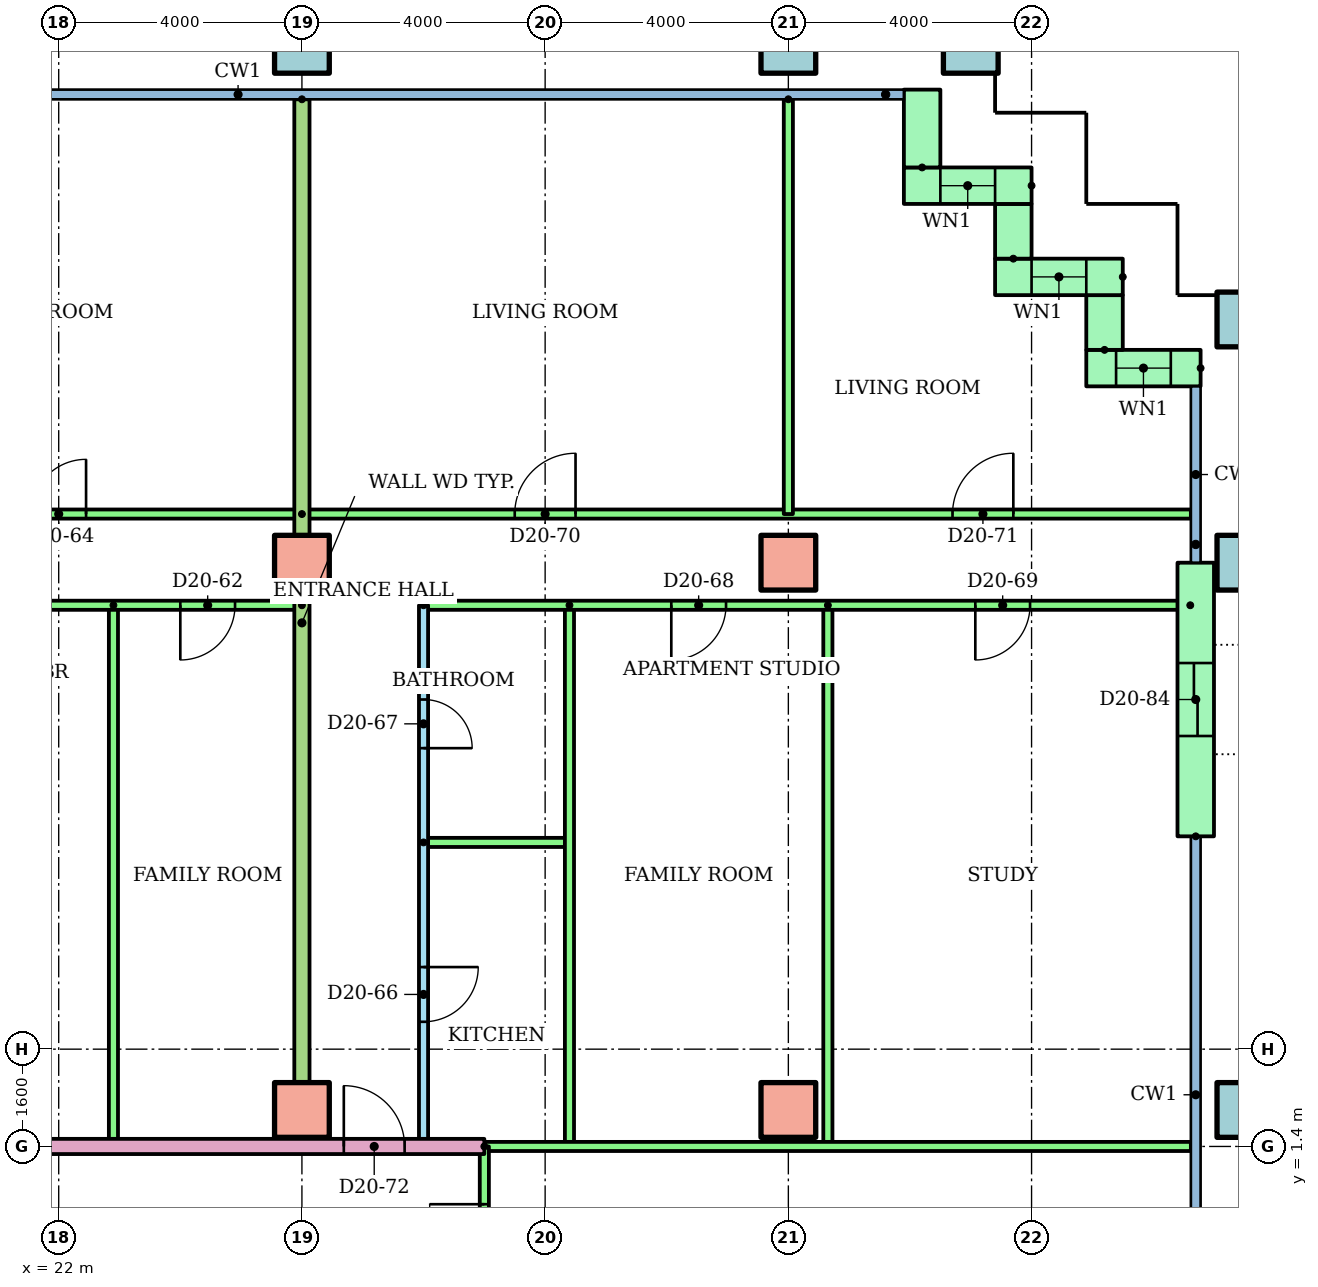
"""IFC4 building model, lengths in metres.
Left out: names, types, materials, properties, quantities, classifications, styles, units other than length and angle.
Written with IfcOpenShell. Run it as: python <this file> out.ifc"""

import sys

from ifc_helpers import new_model, si_unit, direction, frame, frame_2d, origin, origin_2d, place, context, subcontext, project, spatial, rectangle, hollow_rectangle, extrude, element, fill, save


model = new_model("IFC4")
c1 = context("Model", 3, precision=1e-05, world=origin(), true_north=direction((0.0, 1.0)))
c2 = subcontext(c1, "Body", "Model", "MODEL_VIEW")
j1 = project(units=[si_unit("LENGTHUNIT", "METRE"), si_unit("PLANEANGLEUNIT", "RADIAN")], contexts=[c1])
p1 = place(None, origin())
s1 = spatial("IfcSite", under=j1, at=p1, CompositionType="ELEMENT")
p2 = place(p1, origin())
s2 = spatial("IfcBuilding", under=s1, at=p2, CompositionType="ELEMENT")
p3 = place(p2, frame((0.0, 0.0, 80.7)))
s3 = spatial("IfcBuildingStorey", under=s2, at=p3, CompositionType="ELEMENT", Elevation=80.7)
for number, where in (
    (1, (26.0, 2.0, 0.0)),
    (2, (34.0, 2.0, 0.0)),
):
    element("IfcColumn", number, at=place(p3, frame(where)), inside=s3, PredefinedType="COLUMN", context=c2, shape_type="SweptSolid", body=[
        extrude(rectangle(XDim=0.9, YDim=0.9, at=origin_2d()), origin(), (0.0, 0.0, 1.0), 3.2),
    ])
p4 = place(p3, frame((41.5, 2.0, 0.0)))
e3 = element("IfcColumn", 3, at=p4, inside=s3, PredefinedType="COLUMN", context=c2, shape_type="SweptSolid", body=[
    extrude(hollow_rectangle(XDim=0.9, YDim=0.9, WallThickness=0.045, at=origin_2d()), origin(), (0.0, 0.0, 1.0), 3.2),
])
for number, where in (
    (4, (26.0, 11.0, 0.0)),
    (5, (34.0, 11.0, 0.0)),
):
    element("IfcColumn", number, at=place(p3, frame(where)), inside=s3, PredefinedType="COLUMN", context=c2, shape_type="SweptSolid", body=[
        extrude(rectangle(XDim=0.9, YDim=0.9, at=origin_2d()), origin(), (0.0, 0.0, 1.0), 3.2),
    ])
for number, where in (
    (6, (41.5, 11.0, 0.0)),
    (7, (41.5, 15.0, 0.0)),
    (8, (26.0, 19.5, 0.0)),
    (9, (34.0, 19.5, 0.0)),
    (10, (37.0, 19.5, 0.0)),
):
    element("IfcColumn", number, at=place(p3, frame(where)), inside=s3, PredefinedType="COLUMN", context=c2, shape_type="SweptSolid", body=[
        extrude(hollow_rectangle(XDim=0.9, YDim=0.9, WallThickness=0.045, at=origin_2d()), origin(), (0.0, 0.0, 1.0), 3.2),
    ])
p5 = place(p3, frame((40.78, 14.2, 0.0), z_axis=(0.0, 0.0, 1.0), x_axis=(-1.0, 0.0, 0.0)))
e11 = element("IfcWall", 11, at=p5, inside=s3, PredefinedType="STANDARD", context=c2, shape_type="SweptSolid", body=[
    extrude(rectangle(XDim=1.88, YDim=0.6, at=frame_2d((0.94, 0.0))), origin(), (0.0, 0.0, 1.0), 2.92),
])
p6 = place(p5, frame((0.49, 0.0, 0.9)))
e12 = element("IfcOpeningElement", 12, at=p6, cuts=e11, PredefinedType="OPENING", context=c2, shape_type="SweptSolid", body=[
    extrude(rectangle(XDim=0.9, YDim=1.5, at=frame_2d((0.45, 0.75))), frame((0.0, 0.31, 0.0), z_axis=(0.0, -1.0, 0.0), x_axis=(1.0, 0.0, 0.0)), (0.0, 0.0, 1.0), 0.62),
])
p7 = place(p3, frame((39.2, 14.5, 0.0), z_axis=(0.0, 0.0, 1.0), x_axis=(0.0, 1.0, 0.0)))
e13 = element("IfcWall", 13, at=p7, inside=s3, PredefinedType="STANDARD", context=c2, shape_type="SweptSolid", body=[
    extrude(rectangle(XDim=0.9, YDim=0.6, at=frame_2d((0.45, 0.0))), origin(), (0.0, 0.0, 1.0), 2.92),
])
p8 = place(p3, frame((39.5, 15.7, 0.0), z_axis=(0.0, 0.0, 1.0), x_axis=(-1.0, 0.0, 0.0)))
e14 = element("IfcWall", 14, at=p8, inside=s3, PredefinedType="STANDARD", context=c2, shape_type="SweptSolid", body=[
    extrude(rectangle(XDim=2.1, YDim=0.6, at=frame_2d((1.05, 0.0))), origin(), (0.0, 0.0, 1.0), 2.92),
])
p9 = place(p8, frame((0.6, 0.0, 0.9)))
e15 = element("IfcOpeningElement", 15, at=p9, cuts=e14, PredefinedType="OPENING", context=c2, shape_type="SweptSolid", body=[
    extrude(rectangle(XDim=0.9, YDim=1.5, at=frame_2d((0.45, 0.75))), frame((0.0, 0.31, 0.0), z_axis=(0.0, -1.0, 0.0), x_axis=(1.0, 0.0, 0.0)), (0.0, 0.0, 1.0), 0.62),
])
p10 = place(p3, frame((37.7, 16.0, 0.0), z_axis=(0.0, 0.0, 1.0), x_axis=(0.0, 1.0, 0.0)))
e16 = element("IfcWall", 16, at=p10, inside=s3, PredefinedType="STANDARD", context=c2, shape_type="SweptSolid", body=[
    extrude(rectangle(XDim=0.9, YDim=0.6, at=frame_2d((0.45, 0.0))), origin(), (0.0, 0.0, 1.0), 2.92),
])
p11 = place(p3, frame((38.0, 17.2, 0.0), z_axis=(0.0, 0.0, 1.0), x_axis=(-1.0, 0.0, 0.0)))
e17 = element("IfcWall", 17, at=p11, inside=s3, PredefinedType="STANDARD", context=c2, shape_type="SweptSolid", body=[
    extrude(rectangle(XDim=2.1, YDim=0.6, at=frame_2d((1.05, 0.0))), origin(), (0.0, 0.0, 1.0), 2.92),
])
p12 = place(p11, frame((0.6, 0.0, 0.9)))
e18 = element("IfcOpeningElement", 18, at=p12, cuts=e17, PredefinedType="OPENING", context=c2, shape_type="SweptSolid", body=[
    extrude(rectangle(XDim=0.9, YDim=1.5, at=frame_2d((0.45, 0.75))), frame((0.0, 0.31, 0.0), z_axis=(0.0, -1.0, 0.0), x_axis=(1.0, 0.0, 0.0)), (0.0, 0.0, 1.0), 0.62),
])
p13 = place(p3, frame((36.2, 17.5, 0.0), z_axis=(0.0, 0.0, 1.0), x_axis=(0.0, 1.0, 0.0)))
e19 = element("IfcWall", 19, at=p13, inside=s3, PredefinedType="STANDARD", context=c2, shape_type="SweptSolid", body=[
    extrude(rectangle(XDim=1.28, YDim=0.6, at=frame_2d((0.64, 0.0))), origin(), (0.0, 0.0, 1.0), 2.92),
])
p14 = place(p3, frame((40.7, 6.5, 0.0), z_axis=(0.0, 0.0, 1.0), x_axis=(0.0, 1.0, 0.0)))
e20 = element("IfcWall", 20, at=p14, inside=s3, PredefinedType="STANDARD", context=c2, shape_type="SweptSolid", body=[
    extrude(rectangle(XDim=4.5, YDim=0.6, at=frame_2d((2.25, 0.0))), origin(), (0.0, 0.0, 1.0), 2.92),
])
p15 = place(p14, frame((1.65, 0.0, 0.0)))
e21 = element("IfcOpeningElement", 21, at=p15, cuts=e20, PredefinedType="OPENING", context=c2, shape_type="SweptSolid", body=[
    extrude(rectangle(XDim=1.2, YDim=2.1, at=frame_2d((0.6, 1.05))), frame((0.0, 0.31, 0.0), z_axis=(0.0, -1.0, 0.0), x_axis=(1.0, 0.0, 0.0)), (0.0, 0.0, 1.0), 0.62),
])
p16 = place(p3, frame((22.9, 10.3, 0.0), z_axis=(0.0, 0.0, 1.0), x_axis=(0.0, -1.0, 0.0)))
e22 = element("IfcWall", 22, at=p16, inside=s3, PredefinedType="PARTITIONING", context=c2, shape_type="SweptSolid", body=[
    extrude(rectangle(XDim=8.9, YDim=0.15, at=frame_2d((4.45, 0.0))), origin(), (0.0, 0.0, 1.0), 2.4),
])
p17 = place(p3, frame((26.0, 10.3, 0.0), z_axis=(0.0, 0.0, 1.0), x_axis=(-1.0, 0.0, 0.0)))
e23 = element("IfcWall", 23, at=p17, inside=s3, PredefinedType="PARTITIONING", context=c2, shape_type="SweptSolid", body=[
    extrude(rectangle(XDim=10.0, YDim=0.15, at=frame_2d((5.0, 0.0))), origin(), (0.0, 0.0, 1.0), 2.4),
])
p18 = place(p17, frame((4.9, 0.0, 0.0)))
e24 = element("IfcOpeningElement", 24, at=p18, cuts=e23, PredefinedType="OPENING", context=c2, shape_type="SweptSolid", body=[
    extrude(rectangle(XDim=0.9, YDim=2.1, at=frame_2d((0.45, 1.05))), frame((0.0, 0.085, 0.0), z_axis=(0.0, -1.0, 0.0), x_axis=(1.0, 0.0, 0.0)), (0.0, 0.0, 1.0), 0.17),
])
p19 = place(p17, frame((1.1, 0.0, 0.0)))
e25 = element("IfcOpeningElement", 25, at=p19, cuts=e23, PredefinedType="OPENING", context=c2, shape_type="SweptSolid", body=[
    extrude(rectangle(XDim=0.9, YDim=2.1, at=frame_2d((0.45, 1.05))), frame((0.0, 0.085, 0.0), z_axis=(0.0, -1.0, 0.0), x_axis=(1.0, 0.0, 0.0)), (0.0, 0.0, 1.0), 0.17),
])
p20 = place(p3, frame((14.0, 11.8, 0.0)))
e26 = element("IfcWall", 26, at=p20, inside=s3, PredefinedType="PARTITIONING", context=c2, shape_type="SweptSolid", body=[
    extrude(rectangle(XDim=12.0, YDim=0.15, at=frame_2d((6.0, 0.0))), origin(), (0.0, 0.0, 1.0), 2.4),
])
p21 = place(p20, frame((1.5, 0.0, 0.0)))
e27 = element("IfcOpeningElement", 27, at=p21, cuts=e26, PredefinedType="OPENING", context=c2, shape_type="SweptSolid", body=[
    extrude(rectangle(XDim=1.0, YDim=2.1, at=frame_2d((0.5, 1.05))), frame((0.0, 0.085, 0.0), z_axis=(0.0, -1.0, 0.0), x_axis=(1.0, 0.0, 0.0)), (0.0, 0.0, 1.0), 0.17),
])
p22 = place(p20, frame((7.55, 0.0, 0.0)))
e28 = element("IfcOpeningElement", 28, at=p22, cuts=e26, PredefinedType="OPENING", context=c2, shape_type="SweptSolid", body=[
    extrude(rectangle(XDim=0.9, YDim=2.1, at=frame_2d((0.45, 1.05))), frame((0.0, 0.085, 0.0), z_axis=(0.0, -1.0, 0.0), x_axis=(1.0, 0.0, 0.0)), (0.0, 0.0, 1.0), 0.17),
])
p23 = place(p3, frame((28.0, 10.3, 0.0), z_axis=(0.0, 0.0, 1.0), x_axis=(0.0, -1.0, 0.0)))
e29 = element("IfcWall", 29, at=p23, inside=s3, PredefinedType="PARTITIONING", context=c2, shape_type="SweptSolid", body=[
    extrude(rectangle(XDim=8.9, YDim=0.15, at=frame_2d((4.45, 0.0))), origin(), (0.0, 0.0, 1.0), 2.4),
])
p24 = place(p23, frame((5.95, 0.0, 0.0)))
e30 = element("IfcOpeningElement", 30, at=p24, cuts=e29, PredefinedType="OPENING", context=c2, shape_type="SweptSolid", body=[
    extrude(rectangle(XDim=0.9, YDim=2.1, at=frame_2d((0.45, 1.05))), frame((0.0, 0.085, 0.0), z_axis=(0.0, -1.0, 0.0), x_axis=(1.0, 0.0, 0.0)), (0.0, 0.0, 1.0), 0.17),
])
p25 = place(p23, frame((1.55, 0.0, 0.0)))
e31 = element("IfcOpeningElement", 31, at=p25, cuts=e29, PredefinedType="OPENING", context=c2, shape_type="SweptSolid", body=[
    extrude(rectangle(XDim=0.8, YDim=2.1, at=frame_2d((0.4, 1.05))), frame((0.0, 0.085, 0.0), z_axis=(0.0, -1.0, 0.0), x_axis=(1.0, 0.0, 0.0)), (0.0, 0.0, 1.0), 0.17),
])
p26 = place(p3, frame((28.0, 6.4, 0.0)))
e32 = element("IfcWall", 32, at=p26, inside=s3, PredefinedType="PARTITIONING", context=c2, shape_type="SweptSolid", body=[
    extrude(rectangle(XDim=2.4, YDim=0.15, at=frame_2d((1.2, 0.0))), origin(), (0.0, 0.0, 1.0), 2.4),
])
for number, where, z_axis, x_axis in (
    (33, (30.4, 10.3, 0.0), (0.0, 0.0, 1.0), (0.0, -1.0, 0.0)),
    (34, (34.65, 10.3, 0.0), (0.0, 0.0, 1.0), (0.0, -1.0, 0.0)),
):
    element("IfcWall", number, at=place(p3, frame(where, z_axis=z_axis, x_axis=x_axis)), inside=s3, PredefinedType="PARTITIONING", context=c2, shape_type="SweptSolid", body=[
        extrude(rectangle(XDim=8.9, YDim=0.15, at=frame_2d((4.45, 0.0))), origin(), (0.0, 0.0, 1.0), 2.4),
    ])
p27 = place(p3, frame((40.61, 10.3, 0.0), z_axis=(0.0, 0.0, 1.0), x_axis=(-1.0, 0.0, 0.0)))
e35 = element("IfcWall", 35, at=p27, inside=s3, PredefinedType="PARTITIONING", context=c2, shape_type="SweptSolid", body=[
    extrude(rectangle(XDim=12.61, YDim=0.15, at=frame_2d((6.305, 0.0))), origin(), (0.0, 0.0, 1.0), 2.4),
])
p28 = place(p27, frame((7.635, 0.0, 0.0)))
e36 = element("IfcOpeningElement", 36, at=p28, cuts=e35, PredefinedType="OPENING", context=c2, shape_type="SweptSolid", body=[
    extrude(rectangle(XDim=0.9, YDim=2.1, at=frame_2d((0.45, 1.05))), frame((0.0, 0.085, 0.0), z_axis=(0.0, -1.0, 0.0), x_axis=(1.0, 0.0, 0.0)), (0.0, 0.0, 1.0), 0.17),
])
p29 = place(p27, frame((2.635, 0.0, 0.0)))
e37 = element("IfcOpeningElement", 37, at=p29, cuts=e35, PredefinedType="OPENING", context=c2, shape_type="SweptSolid", body=[
    extrude(rectangle(XDim=0.9, YDim=2.1, at=frame_2d((0.45, 1.05))), frame((0.0, 0.085, 0.0), z_axis=(0.0, -1.0, 0.0), x_axis=(1.0, 0.0, 0.0)), (0.0, 0.0, 1.0), 0.17),
])
p30 = place(p3, frame((26.0, 11.8, 0.0)))
e38 = element("IfcWall", 38, at=p30, inside=s3, PredefinedType="PARTITIONING", context=c2, shape_type="SweptSolid", body=[
    extrude(rectangle(XDim=14.62, YDim=0.15, at=frame_2d((7.31, 0.0))), origin(), (0.0, 0.0, 1.0), 2.4),
])
p31 = place(p30, frame((3.5, 0.0, 0.0)))
e39 = element("IfcOpeningElement", 39, at=p31, cuts=e38, PredefinedType="OPENING", context=c2, shape_type="SweptSolid", body=[
    extrude(rectangle(XDim=1.0, YDim=2.1, at=frame_2d((0.5, 1.05))), frame((0.0, 0.085, 0.0), z_axis=(0.0, -1.0, 0.0), x_axis=(1.0, 0.0, 0.0)), (0.0, 0.0, 1.0), 0.17),
])
p32 = place(p30, frame((10.7, 0.0, 0.0)))
e40 = element("IfcOpeningElement", 40, at=p32, cuts=e38, PredefinedType="OPENING", context=c2, shape_type="SweptSolid", body=[
    extrude(rectangle(XDim=1.0, YDim=2.1, at=frame_2d((0.5, 1.05))), frame((0.0, 0.085, 0.0), z_axis=(0.0, -1.0, 0.0), x_axis=(1.0, 0.0, 0.0)), (0.0, 0.0, 1.0), 0.17),
])
p33 = place(p3, frame((34.0, 18.621, 0.0), z_axis=(0.0, 0.0, 1.0), x_axis=(0.0, -1.0, 0.0)))
e41 = element("IfcWall", 41, at=p33, inside=s3, PredefinedType="PARTITIONING", context=c2, shape_type="SweptSolid", body=[
    extrude(rectangle(XDim=6.821, YDim=0.15, at=frame_2d((3.411, 0.0))), origin(), (0.0, 0.0, 1.0), 2.4),
])
p34 = place(p3, frame((26.0, 18.621, 0.0), z_axis=(0.0, 0.0, 1.0), x_axis=(0.0, -1.0, 0.0)))
e42 = element("IfcWall", 42, at=p34, inside=s3, PredefinedType="PARTITIONING", context=c2, shape_type="SweptSolid", body=[
    extrude(rectangle(XDim=17.221, YDim=0.25, at=frame_2d((8.611, 0.0))), origin(), (0.0, 0.0, 1.0), 2.4),
])
p35 = place(p3, frame((14.0, 1.4, 0.0)))
e43 = element("IfcWall", 43, at=p35, inside=s3, PredefinedType="PARTITIONING", context=c2, shape_type="SweptSolid", body=[
    extrude(rectangle(XDim=15.0, YDim=0.25, at=frame_2d((7.5, 0.0))), origin(), (0.0, 0.0, 1.0), 2.4),
])
p36 = place(p35, frame((0.5, 0.0, 0.0)))
e44 = element("IfcOpeningElement", 44, at=p36, cuts=e43, PredefinedType="OPENING", context=c2, shape_type="SweptSolid", body=[
    extrude(rectangle(XDim=1.0, YDim=2.1, at=frame_2d((0.5, 1.05))), frame((0.0, 0.135, 0.0), z_axis=(0.0, -1.0, 0.0), x_axis=(1.0, 0.0, 0.0)), (0.0, 0.0, 1.0), 0.27),
])
p37 = place(p35, frame((12.689, 0.0, 0.0)))
e45 = element("IfcOpeningElement", 45, at=p37, cuts=e43, PredefinedType="OPENING", context=c2, shape_type="SweptSolid", body=[
    extrude(rectangle(XDim=1.0, YDim=2.1, at=frame_2d((0.5, 1.05))), frame((0.0, 0.135, 0.0), z_axis=(0.0, -1.0, 0.0), x_axis=(1.0, 0.0, 0.0)), (0.0, 0.0, 1.0), 0.27),
])
p38 = place(p3, frame((29.0, 1.4, 0.0)))
e46 = element("IfcWall", 46, at=p38, inside=s3, PredefinedType="PARTITIONING", context=c2, shape_type="SweptSolid", body=[
    extrude(rectangle(XDim=11.62, YDim=0.15, at=frame_2d((5.81, 0.0))), origin(), (0.0, 0.0, 1.0), 2.4),
])
p39 = place(p3, frame((29.0, -1.4, 0.0), z_axis=(0.0, 0.0, 1.0), x_axis=(0.0, 1.0, 0.0)))
e47 = element("IfcWall", 47, at=p39, inside=s3, PredefinedType="PARTITIONING", context=c2, shape_type="SweptSolid", body=[
    extrude(rectangle(XDim=2.8, YDim=0.15, at=frame_2d((1.4, 0.0))), origin(), (0.0, 0.0, 1.0), 2.4),
])
p40 = place(p39, frame((0.95, 0.0, 0.0)))
e48 = element("IfcOpeningElement", 48, at=p40, cuts=e47, PredefinedType="OPENING", context=c2, shape_type="SweptSolid", body=[
    extrude(rectangle(XDim=0.9, YDim=2.1, at=frame_2d((0.45, 1.05))), frame((0.0, 0.085, 0.0), z_axis=(0.0, -1.0, 0.0), x_axis=(1.0, 0.0, 0.0)), (0.0, 0.0, 1.0), 0.17),
])
p41 = place(p6, origin())
e49 = element("IfcWindow", 49, at=p41, inside=s3, PartitioningType="SINGLE_PANEL", PredefinedType="WINDOW", context=c2, shape_type="SweptSolid", body=[
    extrude(rectangle(XDim=0.9, YDim=1.5, at=frame_2d((0.45, 0.75))), frame((0.0, 0.03, 0.0), z_axis=(0.0, -1.0, 0.0), x_axis=(1.0, 0.0, 0.0)), (0.0, 0.0, 1.0), 0.06),
])
fill(e12, e49)
p42 = place(p9, origin())
e50 = element("IfcWindow", 50, at=p42, inside=s3, PartitioningType="SINGLE_PANEL", PredefinedType="WINDOW", context=c2, shape_type="SweptSolid", body=[
    extrude(rectangle(XDim=0.9, YDim=1.5, at=frame_2d((0.45, 0.75))), frame((0.0, 0.03, 0.0), z_axis=(0.0, -1.0, 0.0), x_axis=(1.0, 0.0, 0.0)), (0.0, 0.0, 1.0), 0.06),
])
fill(e15, e50)
p43 = place(p12, origin())
e51 = element("IfcWindow", 51, at=p43, inside=s3, PartitioningType="SINGLE_PANEL", PredefinedType="WINDOW", context=c2, shape_type="SweptSolid", body=[
    extrude(rectangle(XDim=0.9, YDim=1.5, at=frame_2d((0.45, 0.75))), frame((0.0, 0.03, 0.0), z_axis=(0.0, -1.0, 0.0), x_axis=(1.0, 0.0, 0.0)), (0.0, 0.0, 1.0), 0.06),
])
fill(e18, e51)
p44 = place(p19, origin())
e52 = element("IfcDoor", 52, at=p44, inside=s3, OperationType="SINGLE_SWING_RIGHT", PredefinedType="DOOR", context=c2, shape_type="SweptSolid", body=[
    extrude(rectangle(XDim=0.9, YDim=2.1, at=frame_2d((0.45, 1.05))), frame((0.0, 0.025, 0.0), z_axis=(0.0, -1.0, 0.0), x_axis=(1.0, 0.0, 0.0)), (0.0, 0.0, 1.0), 0.05),
])
fill(e25, e52)
p45 = place(p22, origin())
e53 = element("IfcDoor", 53, at=p45, inside=s3, OperationType="SINGLE_SWING_RIGHT", PredefinedType="DOOR", context=c2, shape_type="SweptSolid", body=[
    extrude(rectangle(XDim=0.9, YDim=2.1, at=frame_2d((0.45, 1.05))), frame((0.0, 0.025, 0.0), z_axis=(0.0, -1.0, 0.0), x_axis=(1.0, 0.0, 0.0)), (0.0, 0.0, 1.0), 0.05),
])
fill(e28, e53)
p46 = place(p24, origin())
e54 = element("IfcDoor", 54, at=p46, inside=s3, OperationType="SINGLE_SWING_LEFT", PredefinedType="DOOR", context=c2, shape_type="SweptSolid", body=[
    extrude(rectangle(XDim=0.9, YDim=2.1, at=frame_2d((0.45, 1.05))), frame((0.0, 0.025, 0.0), z_axis=(0.0, -1.0, 0.0), x_axis=(1.0, 0.0, 0.0)), (0.0, 0.0, 1.0), 0.05),
])
fill(e30, e54)
p47 = place(p25, origin())
e55 = element("IfcDoor", 55, at=p47, inside=s3, OperationType="SINGLE_SWING_RIGHT", PredefinedType="DOOR", context=c2, shape_type="SweptSolid", body=[
    extrude(rectangle(XDim=0.8, YDim=2.1, at=frame_2d((0.4, 1.05))), frame((0.0, 0.025, 0.0), z_axis=(0.0, -1.0, 0.0), x_axis=(1.0, 0.0, 0.0)), (0.0, 0.0, 1.0), 0.05),
])
fill(e31, e55)
p48 = place(p28, origin())
e56 = element("IfcDoor", 56, at=p48, inside=s3, OperationType="SINGLE_SWING_RIGHT", PredefinedType="DOOR", context=c2, shape_type="SweptSolid", body=[
    extrude(rectangle(XDim=0.9, YDim=2.1, at=frame_2d((0.45, 1.05))), frame((0.0, 0.025, 0.0), z_axis=(0.0, -1.0, 0.0), x_axis=(1.0, 0.0, 0.0)), (0.0, 0.0, 1.0), 0.05),
])
fill(e36, e56)
p49 = place(p29, origin())
e57 = element("IfcDoor", 57, at=p49, inside=s3, OperationType="SINGLE_SWING_RIGHT", PredefinedType="DOOR", context=c2, shape_type="SweptSolid", body=[
    extrude(rectangle(XDim=0.9, YDim=2.1, at=frame_2d((0.45, 1.05))), frame((0.0, 0.025, 0.0), z_axis=(0.0, -1.0, 0.0), x_axis=(1.0, 0.0, 0.0)), (0.0, 0.0, 1.0), 0.05),
])
fill(e37, e57)
p50 = place(p31, origin())
e58 = element("IfcDoor", 58, at=p50, inside=s3, OperationType="SINGLE_SWING_RIGHT", PredefinedType="DOOR", context=c2, shape_type="SweptSolid", body=[
    extrude(rectangle(XDim=1.0, YDim=2.1, at=frame_2d((0.5, 1.05))), frame((0.0, 0.025, 0.0), z_axis=(0.0, -1.0, 0.0), x_axis=(1.0, 0.0, 0.0)), (0.0, 0.0, 1.0), 0.05),
])
fill(e39, e58)
p51 = place(p32, origin())
e59 = element("IfcDoor", 59, at=p51, inside=s3, OperationType="SINGLE_SWING_RIGHT", PredefinedType="DOOR", context=c2, shape_type="SweptSolid", body=[
    extrude(rectangle(XDim=1.0, YDim=2.1, at=frame_2d((0.5, 1.05))), frame((0.0, 0.025, 0.0), z_axis=(0.0, -1.0, 0.0), x_axis=(1.0, 0.0, 0.0)), (0.0, 0.0, 1.0), 0.05),
])
fill(e40, e59)
p52 = place(p37, origin())
e60 = element("IfcDoor", 60, at=p52, inside=s3, OperationType="SINGLE_SWING_LEFT", PredefinedType="DOOR", context=c2, shape_type="SweptSolid", body=[
    extrude(rectangle(XDim=1.0, YDim=2.1, at=frame_2d((0.5, 1.05))), frame((0.0, 0.025, 0.0), z_axis=(0.0, -1.0, 0.0), x_axis=(1.0, 0.0, 0.0)), (0.0, 0.0, 1.0), 0.05),
])
fill(e45, e60)
p53 = place(p40, origin())
e61 = element("IfcDoor", 61, at=p53, inside=s3, OperationType="SINGLE_SWING_RIGHT", PredefinedType="DOOR", context=c2, shape_type="SweptSolid", body=[
    extrude(rectangle(XDim=0.9, YDim=2.1, at=frame_2d((0.45, 1.05))), frame((0.0, 0.025, 0.0), z_axis=(0.0, -1.0, 0.0), x_axis=(1.0, 0.0, 0.0)), (0.0, 0.0, 1.0), 0.05),
])
fill(e48, e61)
p54 = place(p15, origin())
e62 = element("IfcDoor", 62, at=p54, inside=s3, OperationType="SLIDING_TO_LEFT", PredefinedType="DOOR", context=c2, shape_type="SweptSolid", body=[
    extrude(rectangle(XDim=1.2, YDim=2.1, at=frame_2d((0.6, 1.05))), frame((0.0, 0.025, 0.0), z_axis=(0.0, -1.0, 0.0), x_axis=(1.0, 0.0, 0.0)), (0.0, 0.0, 1.0), 0.05),
])
fill(e21, e62)
save(model, sys.argv[1])
